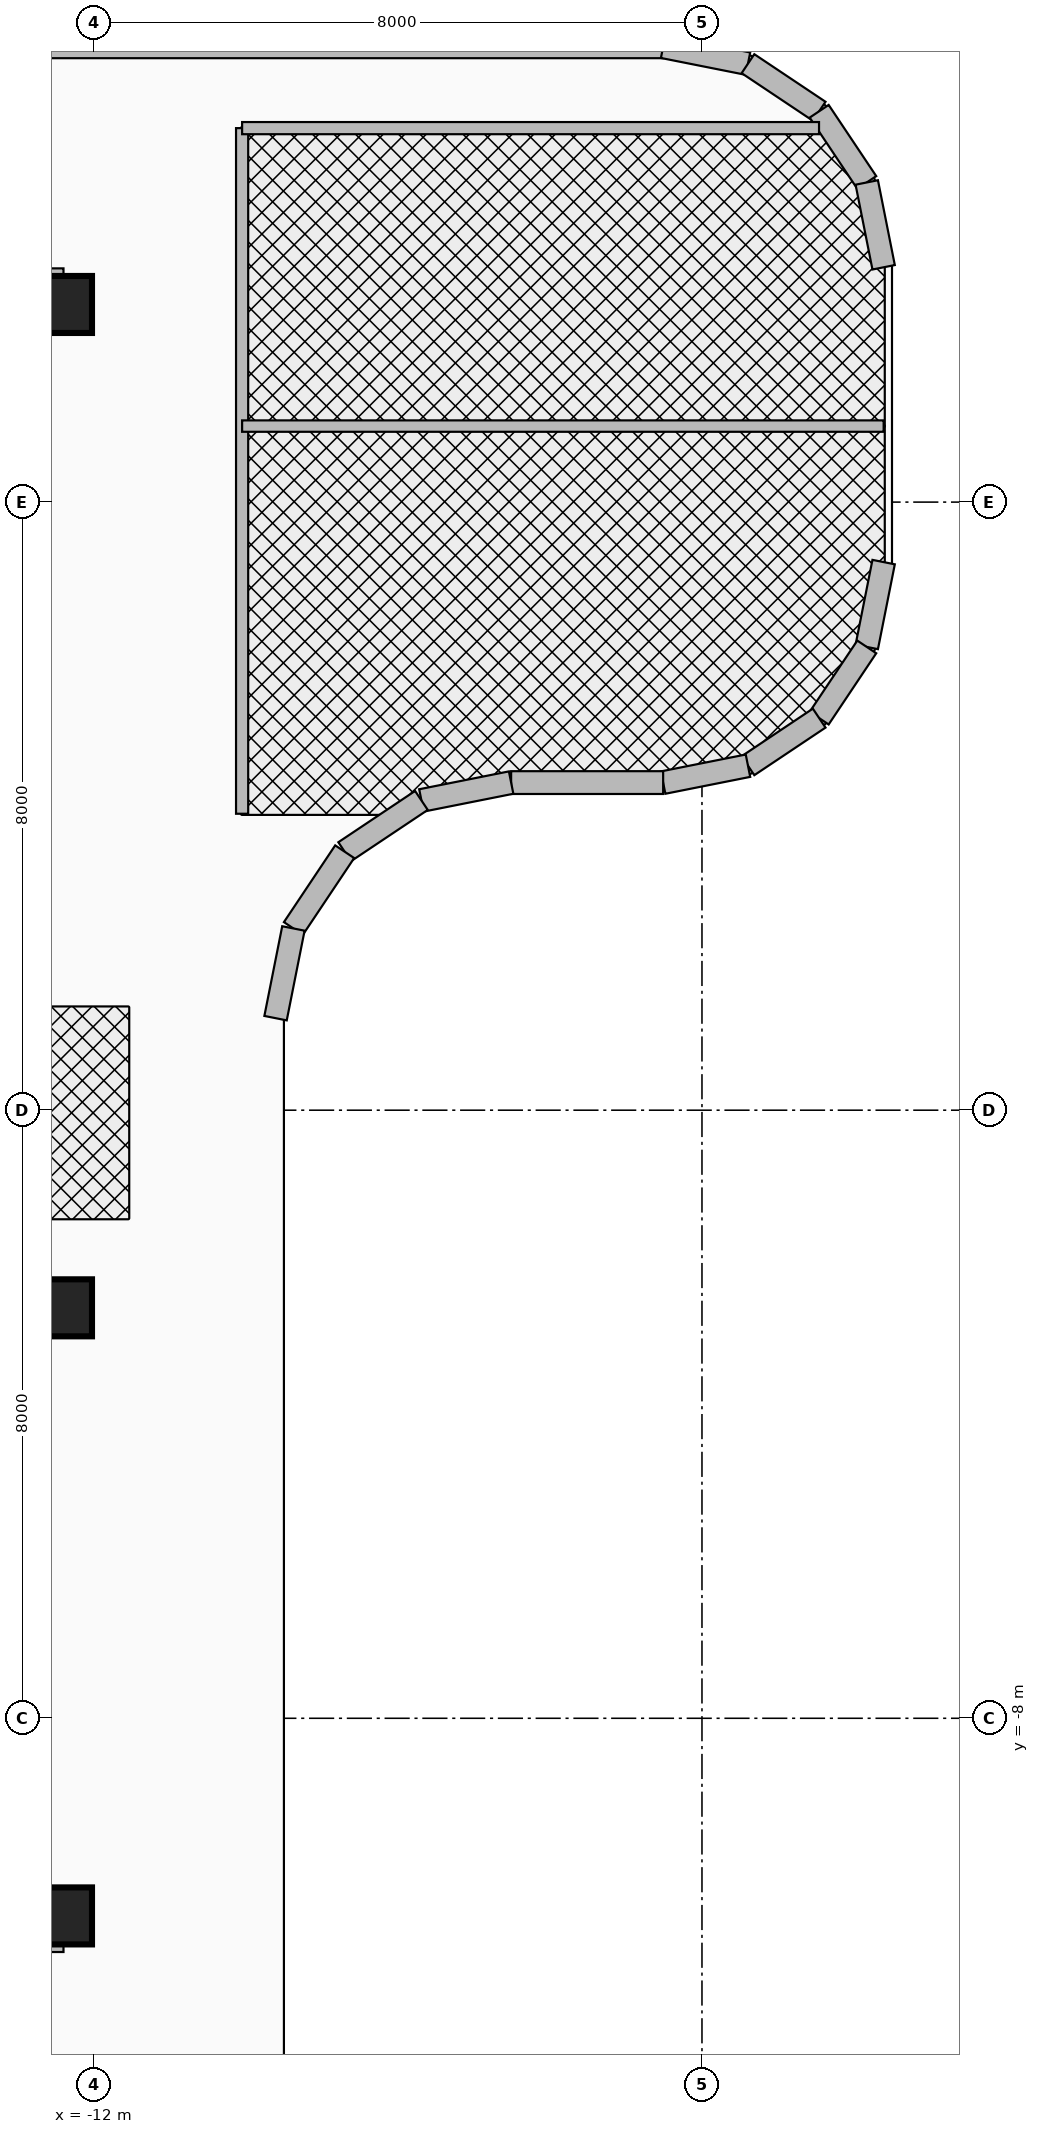
"""IFC4 building model, lengths in metres.
Left out: names, types, materials, properties, quantities, classifications, styles, units other than length and angle.
Written with IfcOpenShell. Run it as: python <this file> out.ifc"""

import sys

from ifc_helpers import new_model, si_unit, direction, frame, frame_2d, origin, origin_2d, place, context, subcontext, project, spatial, rectangle, extrude, source, transform, mapped, element, fill, save


model = new_model("IFC4")
c1 = context("Model", 3, precision=1e-05, world=origin(), true_north=direction((0.0, 1.0)))
c2 = subcontext(c1, "Body", "Model", "MODEL_VIEW")
j1 = project(units=[si_unit("LENGTHUNIT", "METRE"), si_unit("PLANEANGLEUNIT", "RADIAN")], contexts=[c1])
p1 = place(None, origin())
s1 = spatial("IfcSite", under=j1, at=p1, CompositionType="ELEMENT")
p2 = place(p1, origin())
s2 = spatial("IfcBuilding", under=s1, at=p2, CompositionType="ELEMENT")
p3 = place(p2, frame((0.0, 0.0, 290.6)))
s3 = spatial("IfcBuildingStorey", under=s2, at=p3, CompositionType="ELEMENT", Elevation=290.6)
for number, where, z_axis, x_axis in (
    (1, (-22.65, 10.8, 0.0), (0.0, 0.0, 1.0), (1.0, 0.0, 0.0)),
    (2, (-22.65, -10.8, 0.0), (0.0, 0.0, 1.0), (1.0, 0.0, 0.0)),
):
    element("IfcWall", number, at=place(p3, frame(where, z_axis=z_axis, x_axis=x_axis)), inside=s3, PredefinedType="SHEAR", context=c2, shape_type="SweptSolid", body=[
        extrude(rectangle(XDim=10.25, YDim=0.55, at=frame_2d((5.125, 0.0))), origin(), (0.0, 0.0, 1.0), 3.36),
    ])
m1 = source(origin(), c2, "Body", "SweptSolid", [
    extrude(rectangle(XDim=0.75, YDim=0.75, at=origin_2d()), origin(), (0.0, 0.0, 1.0), 3.6),
])
for number, where, z_axis, x_axis in (
    (3, (-12.4, -10.6, 0.0), (0.0, 0.0, 1.0), (1.0, 0.0, 0.0)),
    (4, (-12.4, -2.6, 0.0), (0.0, 0.0, 1.0), (1.0, 0.0, 0.0)),
    (5, (-12.4, 10.6, 0.0), (0.0, 0.0, 1.0), (1.0, 0.0, 0.0)),
):
    element("IfcColumn", number, at=place(p3, frame(where, z_axis=z_axis, x_axis=x_axis)), inside=s3, PredefinedType="COLUMN", context=c2, shape_type="MappedRepresentation", body=[
        mapped(m1, transform((0.0, 0.0, 0.0), x_axis=(1.0, 0.0, 0.0), y_axis=(0.0, 1.0, 0.0), z_axis=(0.0, 0.0, 1.0), scale=1.0)),
    ])
p4 = place(p3, frame((-26.989, 13.99, 0.0), z_axis=(0.0, 0.0, 1.0), x_axis=(1.0, 0.0, 0.0)))
e6 = element("IfcWall", 6, at=p4, inside=s3, PredefinedType="SOLIDWALL", context=c2, shape_type="SweptSolid", body=[
    extrude(rectangle(XDim=22.479, YDim=0.3, at=frame_2d((11.239, 0.0))), origin(), (0.0, 0.0, 1.0), 2.734),
])
p5 = place(p4, frame((10.79, 0.0, 0.0)))
e7 = element("IfcOpeningElement", 7, at=p5, cuts=e6, PredefinedType="OPENING", context=c2, shape_type="SweptSolid", body=[
    extrude(rectangle(XDim=1.2, YDim=2.15, at=frame_2d((0.6, 1.075))), frame((0.0, 0.165, 0.0), z_axis=(0.0, -1.0, 0.0), x_axis=(1.0, 0.0, 0.0)), (0.0, 0.0, 1.0), 0.33),
])
p6 = place(p3, frame((-4.511, 13.99, 0.0), z_axis=(0.0, 0.0, 1.0), x_axis=(0.980794657743, -0.195043173023, 0.0)))
e8 = element("IfcWall", 8, at=p6, inside=s3, PredefinedType="SOLIDWALL", context=c2, shape_type="SweptSolid", body=[
    extrude(rectangle(XDim=1.138, YDim=0.3, at=frame_2d((0.569, 0.0))), origin(), (0.0, 0.0, 1.0), 3.36),
])
p7 = place(p3, frame((-3.395, 13.768, 0.0), z_axis=(0.0, 0.0, 1.0), x_axis=(0.831449735491, -0.555599979619, 0.0)))
e9 = element("IfcWall", 9, at=p7, inside=s3, PredefinedType="SOLIDWALL", context=c2, shape_type="SweptSolid", body=[
    extrude(rectangle(XDim=1.127, YDim=0.3, at=frame_2d((0.563, 0.0))), origin(), (0.0, 0.0, 1.0), 3.36),
])
p8 = place(p3, frame((-2.458, 13.142, 0.0), z_axis=(0.0, 0.0, 1.0), x_axis=(0.555499891703, -0.831516608564, 0.0)))
e10 = element("IfcWall", 10, at=p8, inside=s3, PredefinedType="SOLIDWALL", context=c2, shape_type="SweptSolid", body=[
    extrude(rectangle(XDim=1.127, YDim=0.3, at=frame_2d((0.563, 0.0))), origin(), (0.0, 0.0, 1.0), 3.36),
])
for number, where, z_axis, x_axis in (
    (11, (-1.832, 12.205, 0.0), (0.0, 0.0, 1.0), (0.195, -0.981, 0.0)),
    (12, (-1.61, 7.211, 0.0), (0.0, 0.0, 1.0), (-0.195, -0.981, 0.0)),
):
    element("IfcWall", number, at=place(p3, frame(where, z_axis=z_axis, x_axis=x_axis)), inside=s3, PredefinedType="SOLIDWALL", context=c2, shape_type="SweptSolid", body=[
        extrude(rectangle(XDim=1.138, YDim=0.3, at=frame_2d((0.569, 0.0))), origin(), (0.0, 0.0, 1.0), 3.36),
    ])
for number, where, z_axis, x_axis in (
    (13, (-1.832, 6.095, 0.0), (0.0, 0.0, 1.0), (-0.556, -0.831, 0.0)),
    (14, (-2.458, 5.158, 0.0), (0.0, 0.0, 1.0), (-0.831, -0.556, 0.0)),
):
    element("IfcWall", number, at=place(p3, frame(where, z_axis=z_axis, x_axis=x_axis)), inside=s3, PredefinedType="SOLIDWALL", context=c2, shape_type="SweptSolid", body=[
        extrude(rectangle(XDim=1.127, YDim=0.3, at=frame_2d((0.563, 0.0))), origin(), (0.0, 0.0, 1.0), 3.36),
    ])
p9 = place(p3, frame((-3.395, 4.532, 0.0), z_axis=(0.0, 0.0, 1.0), x_axis=(-0.980794657743, -0.195043173023, 0.0)))
e15 = element("IfcWall", 15, at=p9, inside=s3, PredefinedType="SOLIDWALL", context=c2, shape_type="SweptSolid", body=[
    extrude(rectangle(XDim=1.138, YDim=0.3, at=frame_2d((0.569, 0.0))), origin(), (0.0, 0.0, 1.0), 3.36),
])
p10 = place(p3, frame((-4.511, 4.31, 0.0), z_axis=(0.0, 0.0, 1.0), x_axis=(-1.0, 0.0, 0.0)))
e16 = element("IfcWall", 16, at=p10, inside=s3, PredefinedType="SOLIDWALL", context=c2, shape_type="SweptSolid", body=[
    extrude(rectangle(XDim=2.0, YDim=0.3, at=frame_2d((1.0, 0.0))), origin(), (0.0, 0.0, 1.0), 3.36),
])
p11 = place(p10, frame((0.45, 0.0, 0.9)))
e17 = element("IfcOpeningElement", 17, at=p11, cuts=e16, PredefinedType="OPENING", context=c2, shape_type="SweptSolid", body=[
    extrude(rectangle(XDim=1.1, YDim=1.55, at=frame_2d((0.55, 0.775))), frame((0.0, 0.165, 0.0), z_axis=(0.0, -1.0, 0.0), x_axis=(1.0, 0.0, 0.0)), (0.0, 0.0, 1.0), 0.33),
])
p12 = place(p3, frame((-6.511, 4.31, 0.0), z_axis=(0.0, 0.0, 1.0), x_axis=(-0.980767511126, -0.195179632955, 0.0)))
e18 = element("IfcWall", 18, at=p12, inside=s3, PredefinedType="SOLIDWALL", context=c2, shape_type="SweptSolid", body=[
    extrude(rectangle(XDim=1.203, YDim=0.3, at=frame_2d((0.602, 0.0))), origin(), (0.0, 0.0, 1.0), 3.36),
])
p13 = place(p3, frame((-7.691, 4.075, 0.0), z_axis=(0.0, 0.0, 1.0), x_axis=(-0.83152410926, -0.555488663899, 0.0)))
e19 = element("IfcWall", 19, at=p13, inside=s3, PredefinedType="SOLIDWALL", context=c2, shape_type="SweptSolid", body=[
    extrude(rectangle(XDim=1.214, YDim=0.3, at=frame_2d((0.607, 0.0))), origin(), (0.0, 0.0, 1.0), 3.36),
])
p14 = place(p3, frame((-8.701, 3.401, 0.0), z_axis=(0.0, 0.0, 1.0), x_axis=(-0.555581539313, -0.831462057568, 0.0)))
e20 = element("IfcWall", 20, at=p14, inside=s3, PredefinedType="SOLIDWALL", context=c2, shape_type="SweptSolid", body=[
    extrude(rectangle(XDim=1.214, YDim=0.3, at=frame_2d((0.607, 0.0))), origin(), (0.0, 0.0, 1.0), 3.36),
])
p15 = place(p3, frame((-9.375, 2.391, 0.0), z_axis=(0.0, 0.0, 1.0), x_axis=(-0.195140802248, -0.98077523791, 0.0)))
e21 = element("IfcWall", 21, at=p15, inside=s3, PredefinedType="SOLIDWALL", context=c2, shape_type="SweptSolid", body=[
    extrude(rectangle(XDim=1.204, YDim=0.3, at=frame_2d((0.602, 0.0))), origin(), (0.0, 0.0, 1.0), 3.36),
])
p16 = place(p3, frame((-10.05, 3.9, 0.0), z_axis=(0.0, 0.0, 1.0), x_axis=(0.0, 1.0, 0.0)))
e22 = element("IfcWall", 22, at=p16, inside=s3, PredefinedType="PARTITIONING", context=c2, shape_type="SweptSolid", body=[
    extrude(rectangle(XDim=9.02, YDim=0.16, at=frame_2d((4.51, 0.0))), origin(), (0.0, 0.0, 1.0), 3.36),
])
p17 = place(p16, frame((1.4, 0.0, 0.0)))
e23 = element("IfcOpeningElement", 23, at=p17, cuts=e22, PredefinedType="OPENING", context=c2, shape_type="SweptSolid", body=[
    extrude(rectangle(XDim=1.8, YDim=2.15, at=frame_2d((0.9, 1.075))), frame((0.0, 0.095, 0.0), z_axis=(0.0, -1.0, 0.0), x_axis=(1.0, 0.0, 0.0)), (0.0, 0.0, 1.0), 0.19),
])
p18 = place(p3, frame((-10.05, 12.92, 0.0), z_axis=(0.0, 0.0, 1.0), x_axis=(1.0, 0.0, 0.0)))
e24 = element("IfcWall", 24, at=p18, inside=s3, PredefinedType="PARTITIONING", context=c2, shape_type="SweptSolid", body=[
    extrude(rectangle(XDim=7.59, YDim=0.16, at=frame_2d((3.795, 0.0))), origin(), (0.0, 0.0, 1.0), 3.36),
])
p19 = place(p3, frame((-10.05, 9.0, 0.0), z_axis=(0.0, 0.0, 1.0), x_axis=(1.0, 0.0, 0.0)))
e25 = element("IfcWall", 25, at=p19, inside=s3, PredefinedType="PARTITIONING", context=c2, shape_type="SweptSolid", body=[
    extrude(rectangle(XDim=8.44, YDim=0.15, at=frame_2d((4.22, 0.0))), origin(), (0.0, 0.0, 1.0), 3.36),
])
p20 = place(p19, frame((2.5, 0.0, 0.0)))
e26 = element("IfcOpeningElement", 26, at=p20, cuts=e25, PredefinedType="OPENING", context=c2, shape_type="SweptSolid", body=[
    extrude(rectangle(XDim=0.9, YDim=2.1, at=frame_2d((0.45, 1.05))), frame((0.0, 0.09, 0.0), z_axis=(0.0, -1.0, 0.0), x_axis=(1.0, 0.0, 0.0)), (0.0, 0.0, 1.0), 0.18),
])
p21 = place(p11, origin())
e27 = element("IfcWindow", 27, at=p21, inside=s3, PartitioningType="SINGLE_PANEL", PredefinedType="WINDOW", context=c2, shape_type="SweptSolid", body=[
    extrude(rectangle(XDim=1.1, YDim=1.55, at=frame_2d((0.55, 0.775))), frame((0.0, 0.03, 0.0), z_axis=(0.0, -1.0, 0.0), x_axis=(1.0, 0.0, 0.0)), (0.0, 0.0, 1.0), 0.06),
])
fill(e17, e27)
p22 = place(p17, frame((1.8, 0.0, 0.0), z_axis=(0.0, 0.0, 1.0), x_axis=(-1.0, 0.0, 0.0)))
e28 = element("IfcDoor", 28, at=p22, inside=s3, OperationType="DOUBLE_DOOR_SINGLE_SWING", PredefinedType="DOOR", context=c2, shape_type="SweptSolid", body=[
    extrude(rectangle(XDim=1.8, YDim=2.15, at=frame_2d((0.9, 1.075))), frame((0.0, 0.025, 0.0), z_axis=(0.0, -1.0, 0.0), x_axis=(1.0, 0.0, 0.0)), (0.0, 0.0, 1.0), 0.05),
])
fill(e23, e28)
p23 = place(p20, origin())
e29 = element("IfcDoor", 29, at=p23, inside=s3, OperationType="SINGLE_SWING_RIGHT", PredefinedType="DOOR", context=c2, shape_type="SweptSolid", body=[
    extrude(rectangle(XDim=0.9, YDim=2.1, at=frame_2d((0.45, 1.05))), frame((0.0, 0.025, 0.0), z_axis=(0.0, -1.0, 0.0), x_axis=(1.0, 0.0, 0.0)), (0.0, 0.0, 1.0), 0.05),
])
fill(e26, e29)
save(model, sys.argv[1])
